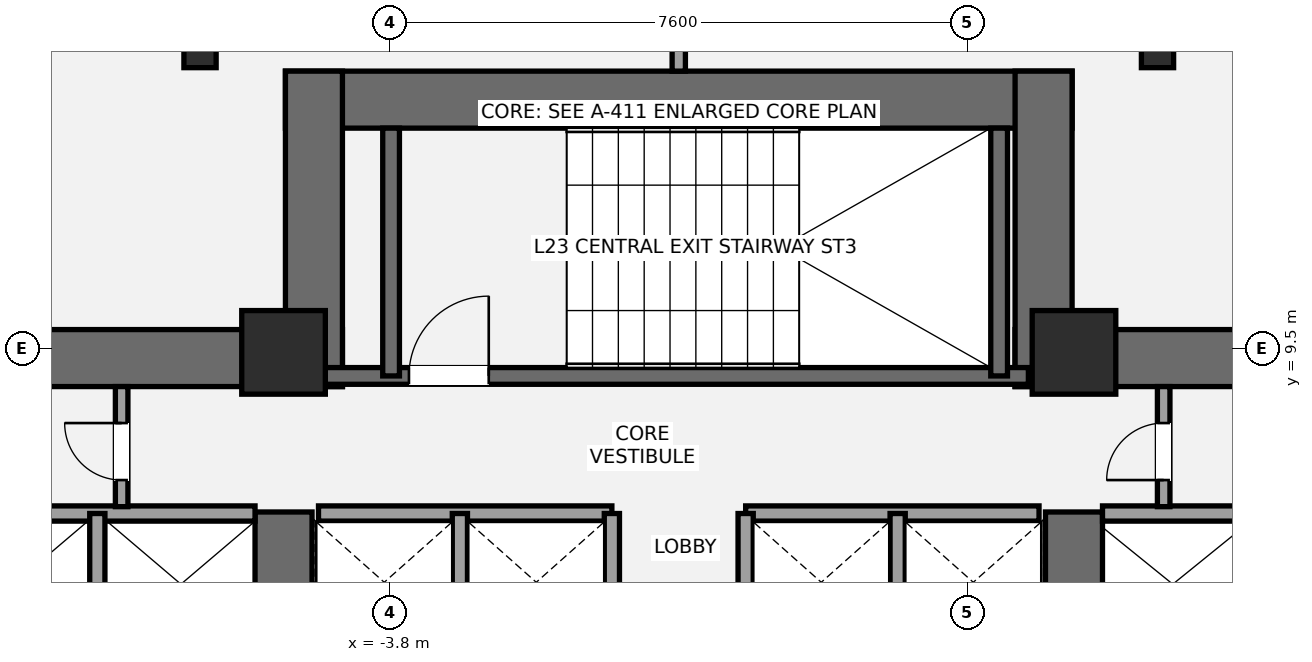
"""IFC4 building model, lengths in metres.
Left out: names, types, materials, properties, quantities, classifications, styles, units other than length and angle.
Written with IfcOpenShell. Run it as: python <this file> out.ifc"""

import sys

from ifc_helpers import new_model, si_unit, direction, frame, frame_2d, origin, origin_2d, place, context, subcontext, project, spatial, rectangle, i_section, extrude, element, fill, save


model = new_model("IFC4")
c1 = context("Model", 3, precision=1e-05, world=origin(), true_north=direction((0.0, 1.0)))
c2 = subcontext(c1, "Body", "Model", "MODEL_VIEW")
j1 = project(units=[si_unit("LENGTHUNIT", "METRE"), si_unit("PLANEANGLEUNIT", "RADIAN")], contexts=[c1])
p1 = place(None, origin())
s1 = spatial("IfcSite", under=j1, at=p1, CompositionType="ELEMENT")
p2 = place(p1, origin())
s2 = spatial("IfcBuilding", under=s1, at=p2, CompositionType="ELEMENT")
p3 = place(p2, frame((0.0, 0.0, 89.6)))
s3 = spatial("IfcBuildingStorey", under=s2, at=p3, CompositionType="ELEMENT", Elevation=89.6)
p4 = place(p3, frame((-13.9, 9.375, 0.0), z_axis=(0.0, 0.0, 1.0), x_axis=(1.0, 0.0, 0.0)))
e1 = element("IfcWall", 1, at=p4, inside=s3, PredefinedType="SHEAR", context=c2, shape_type="SweptSolid", body=[
    extrude(rectangle(XDim=9.475, YDim=0.75, at=frame_2d((4.737, 0.0))), origin(), (0.0, 0.0, 1.0), 3.5),
])
p5 = place(p3, frame((-5.2, 5.35, 0.0), z_axis=(0.0, 0.0, 1.0), x_axis=(0.0, 1.0, 0.0)))
e2 = element("IfcWall", 2, at=p5, inside=s3, PredefinedType="SHEAR", context=c2, shape_type="SweptSolid", body=[
    extrude(rectangle(XDim=2.0, YDim=0.75, at=frame_2d((1.0, 0.0))), origin(), (0.0, 0.0, 1.0), 3.5),
])
p6 = place(p3, frame((4.425, 9.375, 0.0), z_axis=(0.0, 0.0, 1.0), x_axis=(1.0, 0.0, 0.0)))
e3 = element("IfcWall", 3, at=p6, inside=s3, PredefinedType="SHEAR", context=c2, shape_type="SweptSolid", body=[
    extrude(rectangle(XDim=9.475, YDim=0.75, at=frame_2d((4.737, 0.0))), origin(), (0.0, 0.0, 1.0), 3.5),
])
p7 = place(p3, frame((5.2, 5.35, 0.0), z_axis=(0.0, 0.0, 1.0), x_axis=(0.0, 1.0, 0.0)))
e4 = element("IfcWall", 4, at=p7, inside=s3, PredefinedType="SHEAR", context=c2, shape_type="SweptSolid", body=[
    extrude(rectangle(XDim=2.0, YDim=0.75, at=frame_2d((1.0, 0.0))), origin(), (0.0, 0.0, 1.0), 3.5),
])
p8 = place(p3, frame((-5.175, 12.775, 0.0), z_axis=(0.0, 0.0, 1.0), x_axis=(1.0, 0.0, 0.0)))
e5 = element("IfcWall", 5, at=p8, inside=s3, PredefinedType="SHEAR", context=c2, shape_type="SweptSolid", body=[
    extrude(rectangle(XDim=10.35, YDim=0.75, at=frame_2d((5.175, 0.0))), origin(), (0.0, 0.0, 1.0), 3.5),
])
for number, where, z_axis, x_axis in (
    (6, (-4.8, 9.0, 0.0), (0.0, 0.0, 1.0), (0.0, 1.0, 0.0)),
    (7, (4.8, 9.0, 0.0), (0.0, 0.0, 1.0), (0.0, 1.0, 0.0)),
):
    element("IfcWall", number, at=place(p3, frame(where, z_axis=z_axis, x_axis=x_axis)), inside=s3, PredefinedType="SHEAR", context=c2, shape_type="SweptSolid", body=[
        extrude(rectangle(XDim=4.15, YDim=0.75, at=frame_2d((2.075, 0.0))), origin(), (0.0, 0.0, 1.0), 3.5),
    ])
p9 = place(p3, frame((-4.7, 9.14, 0.0), z_axis=(0.0, 0.0, 1.0), x_axis=(1.0, 0.0, 0.0)))
e8 = element("IfcWall", 8, at=p9, inside=s3, PredefinedType="SHEAR", context=c2, shape_type="SweptSolid", body=[
    extrude(rectangle(XDim=9.3, YDim=0.22, at=frame_2d((4.65, 0.0))), origin(), (0.0, 0.0, 1.0), 3.5),
])
p10 = place(p9, frame((1.15, 0.0, 0.0)))
e9 = element("IfcOpeningElement", 9, at=p10, cuts=e8, PredefinedType="OPENING", context=c2, shape_type="SweptSolid", body=[
    extrude(rectangle(XDim=1.05, YDim=2.15, at=frame_2d((0.525, 1.075))), frame((0.0, 0.12, 0.0), z_axis=(0.0, -1.0, 0.0), x_axis=(1.0, 0.0, 0.0)), (0.0, 0.0, 1.0), 0.24),
])
for number, where, z_axis, x_axis in (
    (10, (-3.785, 9.14, 0.0), (0.0, 0.0, 1.0), (0.0, 1.0, 0.0)),
    (11, (4.215, 9.14, 0.0), (0.0, 0.0, 1.0), (0.0, 1.0, 0.0)),
):
    element("IfcWall", number, at=place(p3, frame(where, z_axis=z_axis, x_axis=x_axis)), inside=s3, PredefinedType="SHEAR", context=c2, shape_type="SweptSolid", body=[
        extrude(rectangle(XDim=3.26, YDim=0.22, at=frame_2d((1.63, 0.0))), origin(), (0.0, 0.0, 1.0), 3.5),
    ])
for number, where, z_axis, x_axis in (
    (12, (-5.2, 9.45, 0.0), (0.0, 0.0, 1.0), (1.0, 0.0, 0.0)),
    (13, (5.2, 9.45, 0.0), (0.0, 0.0, 1.0), (1.0, 0.0, 0.0)),
):
    element("IfcColumn", number, at=place(p3, frame(where, z_axis=z_axis, x_axis=x_axis)), inside=s3, PredefinedType="COLUMN", context=c2, shape_type="SweptSolid", body=[
        extrude(rectangle(XDim=1.1, YDim=1.1, at=origin_2d()), origin(), (0.0, 0.0, 1.0), 3.5),
    ])
for number, where, z_axis, x_axis in (
    (14, (6.299, 13.433, 0.0), (0.0, 0.0, 1.0), (1.0, 0.0, 0.0)),
    (15, (-6.299, 13.433, 0.0), (0.0, 0.0, 1.0), (1.0, 0.0, 0.0)),
):
    element("IfcColumn", number, at=place(p3, frame(where, z_axis=z_axis, x_axis=x_axis)), inside=s3, PredefinedType="COLUMN", context=c2, shape_type="SweptSolid", body=[
        extrude(i_section(OverallWidth=0.424, OverallDepth=0.474, WebThickness=0.048, FlangeThickness=0.077, at=origin_2d()), origin(), (0.0, 0.0, 1.0), 3.5),
    ])
p11 = place(p3, frame((-9.78, 7.33, 0.0), z_axis=(0.0, 0.0, 1.0), x_axis=(1.0, 0.0, 0.0)))
e16 = element("IfcWall", 16, at=p11, inside=s3, PredefinedType="SOLIDWALL", context=c2, shape_type="SweptSolid", body=[
    extrude(rectangle(XDim=4.205, YDim=0.2, at=frame_2d((2.103, 0.0))), origin(), (0.0, 0.0, 1.0), 3.31),
])
p12 = place(p3, frame((-7.65, 5.47, 0.0), z_axis=(0.0, 0.0, 1.0), x_axis=(0.0, 1.0, 0.0)))
e17 = element("IfcWall", 17, at=p12, inside=s3, PredefinedType="SOLIDWALL", context=c2, shape_type="SweptSolid", body=[
    extrude(rectangle(XDim=1.86, YDim=0.2, at=frame_2d((0.93, 0.0))), origin(), (0.0, 0.0, 1.0), 3.31),
])
p13 = place(p3, frame((5.575, 7.33, 0.0), z_axis=(0.0, 0.0, 1.0), x_axis=(1.0, 0.0, 0.0)))
e18 = element("IfcWall", 18, at=p13, inside=s3, PredefinedType="SOLIDWALL", context=c2, shape_type="SweptSolid", body=[
    extrude(rectangle(XDim=4.205, YDim=0.2, at=frame_2d((2.103, 0.0))), origin(), (0.0, 0.0, 1.0), 3.31),
])
for number, where, z_axis, x_axis in (
    (19, (-4.74, 7.33, 0.0), (0.0, 0.0, 1.0), (1.0, 0.0, 0.0)),
    (20, (0.88, 7.33, 0.0), (0.0, 0.0, 1.0), (1.0, 0.0, 0.0)),
):
    element("IfcWall", number, at=place(p3, frame(where, z_axis=z_axis, x_axis=x_axis)), inside=s3, PredefinedType="SOLIDWALL", context=c2, shape_type="SweptSolid", body=[
        extrude(rectangle(XDim=3.86, YDim=0.2, at=frame_2d((1.93, 0.0))), origin(), (0.0, 0.0, 1.0), 3.31),
    ])
for number, where, z_axis, x_axis in (
    (21, (-2.88, 5.52, 0.0), (0.0, 0.0, 1.0), (0.0, 1.0, 0.0)),
    (22, (2.88, 5.52, 0.0), (0.0, 0.0, 1.0), (0.0, 1.0, 0.0)),
    (23, (-0.88, 5.52, 0.0), (0.0, 0.0, 1.0), (0.0, 1.0, 0.0)),
    (24, (0.88, 5.52, 0.0), (0.0, 0.0, 1.0), (0.0, 1.0, 0.0)),
):
    element("IfcWall", number, at=place(p3, frame(where, z_axis=z_axis, x_axis=x_axis)), inside=s3, PredefinedType="SOLIDWALL", context=c2, shape_type="SweptSolid", body=[
        extrude(rectangle(XDim=1.81, YDim=0.2, at=frame_2d((0.905, 0.0))), origin(), (0.0, 0.0, 1.0), 3.31),
    ])
p14 = place(p3, frame((-7.33, 7.42, 0.0), z_axis=(0.0, 0.0, 1.0), x_axis=(0.0, 1.0, 0.0)))
e25 = element("IfcWall", 25, at=p14, inside=s3, PredefinedType="PARTITIONING", context=c2, shape_type="SweptSolid", body=[
    extrude(rectangle(XDim=1.58, YDim=0.165, at=frame_2d((0.79, 0.0))), origin(), (0.0, 0.0, 1.0), 3.31),
])
p15 = place(p14, frame((0.35, 0.0, 0.0)))
e26 = element("IfcOpeningElement", 26, at=p15, cuts=e25, PredefinedType="OPENING", context=c2, shape_type="SweptSolid", body=[
    extrude(rectangle(XDim=0.75, YDim=2.1, at=frame_2d((0.375, 1.05))), frame((0.0, 0.093, 0.0), z_axis=(0.0, -1.0, 0.0), x_axis=(1.0, 0.0, 0.0)), (0.0, 0.0, 1.0), 0.185),
])
p16 = place(p3, frame((6.38, 7.42, 0.0), z_axis=(0.0, 0.0, 1.0), x_axis=(0.0, 1.0, 0.0)))
e27 = element("IfcWall", 27, at=p16, inside=s3, PredefinedType="PARTITIONING", context=c2, shape_type="SweptSolid", body=[
    extrude(rectangle(XDim=1.58, YDim=0.165, at=frame_2d((0.79, 0.0))), origin(), (0.0, 0.0, 1.0), 3.31),
])
p17 = place(p16, frame((0.35, 0.0, 0.0)))
e28 = element("IfcOpeningElement", 28, at=p17, cuts=e27, PredefinedType="OPENING", context=c2, shape_type="SweptSolid", body=[
    extrude(rectangle(XDim=0.75, YDim=2.1, at=frame_2d((0.375, 1.05))), frame((0.0, 0.093, 0.0), z_axis=(0.0, -1.0, 0.0), x_axis=(1.0, 0.0, 0.0)), (0.0, 0.0, 1.0), 0.185),
])
p18 = place(p3, frame((0.0, 13.15, 0.0), z_axis=(0.0, 0.0, 1.0), x_axis=(0.0, 1.0, 0.0)))
e29 = element("IfcWall", 29, at=p18, inside=s3, PredefinedType="PARTITIONING", context=c2, shape_type="SweptSolid", body=[
    extrude(rectangle(XDim=5.998, YDim=0.175, at=frame_2d((2.999, 0.0))), origin(), (0.0, 0.0, 1.0), 2.763),
])
p19 = place(p10, origin())
e30 = element("IfcDoor", 30, at=p19, inside=s3, OperationType="SINGLE_SWING_RIGHT", PredefinedType="DOOR", context=c2, shape_type="SweptSolid", body=[
    extrude(rectangle(XDim=1.05, YDim=2.15, at=frame_2d((0.525, 1.075))), frame((0.0, 0.025, 0.0), z_axis=(0.0, -1.0, 0.0), x_axis=(1.0, 0.0, 0.0)), (0.0, 0.0, 1.0), 0.05),
])
fill(e9, e30)
p20 = place(p15, origin())
e31 = element("IfcDoor", 31, at=p20, inside=s3, OperationType="SINGLE_SWING_RIGHT", PredefinedType="DOOR", context=c2, shape_type="SweptSolid", body=[
    extrude(rectangle(XDim=0.75, YDim=2.1, at=frame_2d((0.375, 1.05))), frame((0.0, 0.025, 0.0), z_axis=(0.0, -1.0, 0.0), x_axis=(1.0, 0.0, 0.0)), (0.0, 0.0, 1.0), 0.05),
])
fill(e26, e31)
p21 = place(p17, origin())
e32 = element("IfcDoor", 32, at=p21, inside=s3, OperationType="SINGLE_SWING_LEFT", PredefinedType="DOOR", context=c2, shape_type="SweptSolid", body=[
    extrude(rectangle(XDim=0.75, YDim=2.1, at=frame_2d((0.375, 1.05))), frame((0.0, 0.025, 0.0), z_axis=(0.0, -1.0, 0.0), x_axis=(1.0, 0.0, 0.0)), (0.0, 0.0, 1.0), 0.05),
])
fill(e28, e32)
save(model, sys.argv[1])
